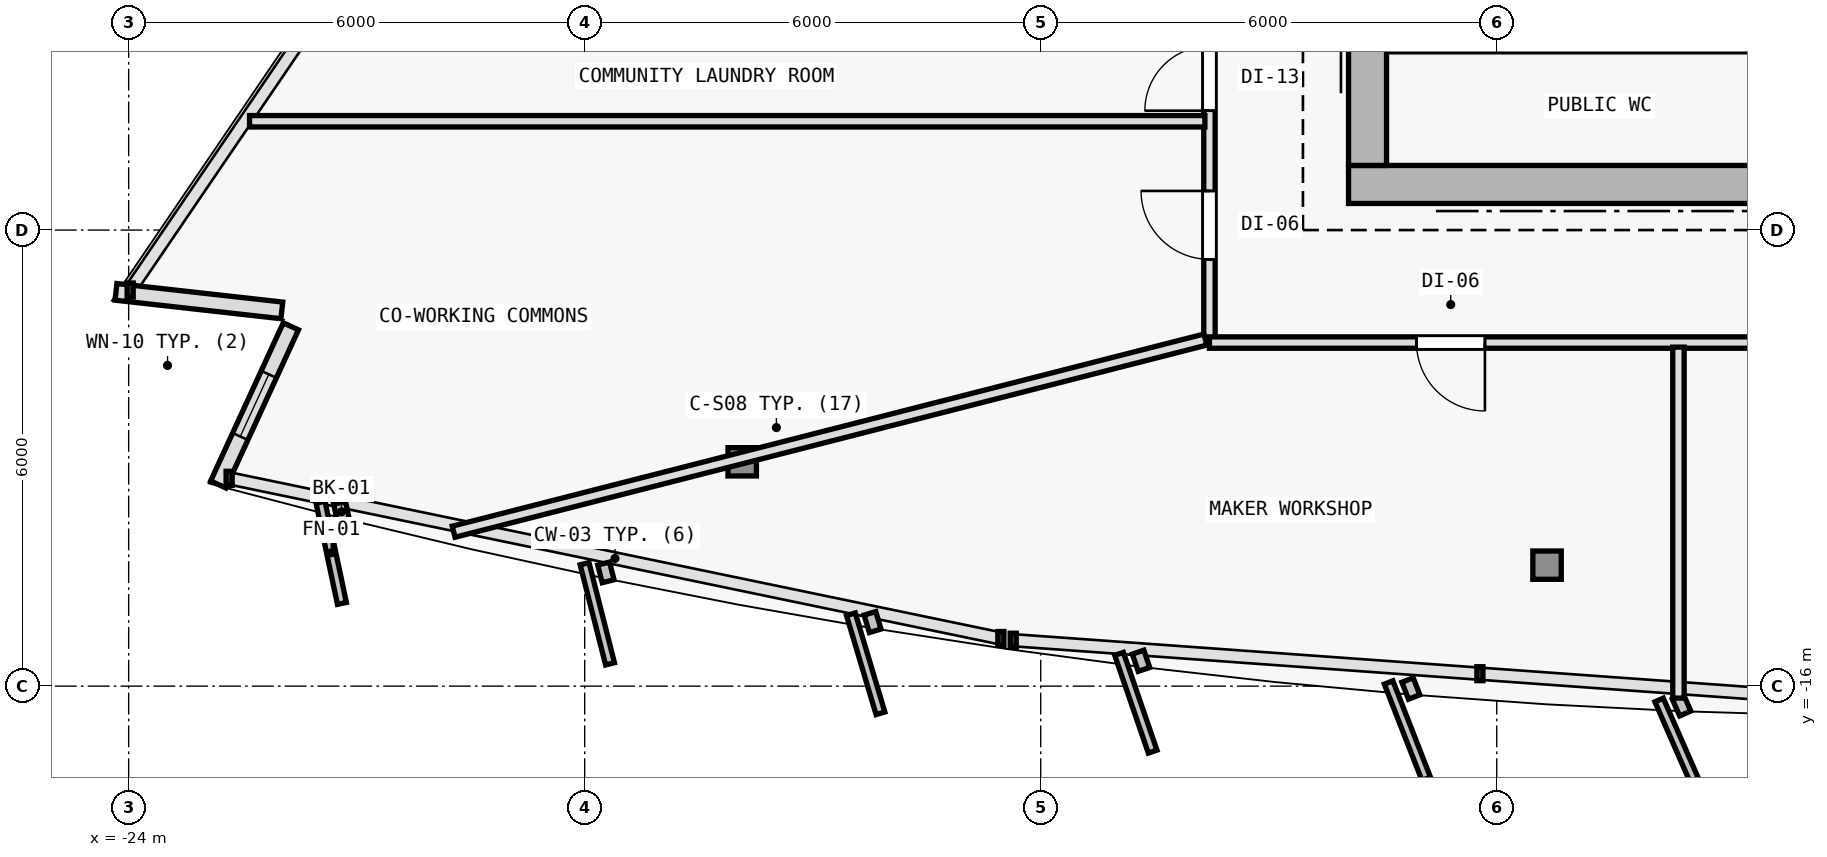
"""IFC4 building model, lengths in metres.
Left out: names, types, materials, properties, quantities, classifications, styles, units other than length and angle.
Written with IfcOpenShell. Run it as: python <this file> out.ifc"""

import sys

from ifc_helpers import new_model, si_unit, direction, frame, frame_2d, origin, origin_2d, place, context, subcontext, project, spatial, rectangle, i_section, extrude, element, fill, save


model = new_model("IFC4")
c1 = context("Model", 3, precision=1e-05, world=origin(), true_north=direction((0.0, 1.0)))
c2 = subcontext(c1, "Body", "Model", "MODEL_VIEW")
j1 = project(units=[si_unit("LENGTHUNIT", "METRE"), si_unit("PLANEANGLEUNIT", "RADIAN")], contexts=[c1])
p1 = place(None, origin())
s1 = spatial("IfcSite", under=j1, at=p1, CompositionType="ELEMENT")
p2 = place(p1, origin())
s2 = spatial("IfcBuilding", under=s1, at=p2, CompositionType="ELEMENT")
p3 = place(p2, frame((0.0, 0.0, 250.8)))
s3 = spatial("IfcBuildingStorey", under=s2, at=p3, CompositionType="ELEMENT", Elevation=250.8)
p4 = place(p3, frame((-7.7, -9.4, 0.0), z_axis=(0.0, 0.0, 1.0), x_axis=(1.0, 0.0, 0.0)))
e1 = element("IfcColumn", 1, at=p4, inside=s3, PredefinedType="COLUMN", context=c2, shape_type="SweptSolid", body=[
    extrude(i_section(OverallWidth=0.374, OverallDepth=0.372, WebThickness=0.012, FlangeThickness=0.02, FilletRadius=0.015, at=origin_2d()), origin(), (0.0, 0.0, 1.0), 3.6),
])
p5 = place(p3, frame((-15.927, -13.049, 0.005), z_axis=(0.020594893987, 0.033509183946, 0.999226193078), x_axis=(-0.851954850327, 0.523615252838, 0.0)))
e2 = element("IfcColumn", 2, at=p5, inside=s3, PredefinedType="COLUMN", context=c2, shape_type="SweptSolid", body=[
    extrude(i_section(OverallWidth=0.374, OverallDepth=0.372, WebThickness=0.012, FlangeThickness=0.02, FilletRadius=0.015, at=origin_2d()), origin(), (0.0, 0.0, 1.0), 3.592),
])
p6 = place(p3, frame((-5.338, -14.408, 0.005), z_axis=(0.006865841702, 0.035280909339, 0.999353850072), x_axis=(-0.981585848295, 0.191021523464, 0.0)))
e3 = element("IfcColumn", 3, at=p6, inside=s3, PredefinedType="COLUMN", context=c2, shape_type="SweptSolid", body=[
    extrude(i_section(OverallWidth=0.374, OverallDepth=0.372, WebThickness=0.012, FlangeThickness=0.02, FilletRadius=0.015, at=origin_2d()), origin(), (0.0, 0.0, 1.0), 3.592),
])
p7 = place(p3, frame((-21.985, -11.057, 0.0), z_axis=(0.0, 0.0, 1.0), x_axis=(-0.993823926228, 0.110968480463, 0.0)))
e4 = element("IfcWall", 4, at=p7, inside=s3, PredefinedType="SOLIDWALL", context=c2, shape_type="SweptSolid", body=[
    extrude(rectangle(XDim=2.196, YDim=0.22, at=frame_2d((1.098, 0.0))), origin(), (0.0, 0.0, 1.0), 3.35),
])
p8 = place(p3, frame((-22.822, -13.347, 0.0), z_axis=(0.0, 0.0, 1.0), x_axis=(0.417447808253, 0.908700900949, 0.0)))
e5 = element("IfcWall", 5, at=p8, inside=s3, PredefinedType="SOLIDWALL", context=c2, shape_type="SweptSolid", body=[
    extrude(rectangle(XDim=2.289, YDim=0.22, at=frame_2d((1.145, 0.0))), origin(), (0.0, 0.0, 1.0), 3.35),
])
p9 = place(p8, frame((0.695, 0.0, 0.62)))
e6 = element("IfcOpeningElement", 6, at=p9, cuts=e5, PredefinedType="OPENING", context=c2, shape_type="SweptSolid", body=[
    extrude(rectangle(XDim=0.9, YDim=1.6, at=frame_2d((0.45, 0.8))), frame((0.0, 0.12, 0.0), z_axis=(0.0, -1.0, 0.0), x_axis=(1.0, 0.0, 0.0)), (0.0, 0.0, 1.0), 0.24),
])
p10 = place(p3, frame((-7.95, -9.4, 0.0), z_axis=(0.0, 0.0, 1.0), x_axis=(1.0, 0.0, 0.0)))
e7 = element("IfcWall", 7, at=p10, inside=s3, PredefinedType="SHEAR", context=c2, shape_type="SweptSolid", body=[
    extrude(rectangle(XDim=15.9, YDim=0.5, at=frame_2d((7.95, 0.0))), origin(), (0.0, 0.0, 1.0), 3.35),
])
p11 = place(p10, frame((9.6, 0.0, 0.0)))
e8 = element("IfcOpeningElement", 8, at=p11, cuts=e7, PredefinedType="OPENING", context=c2, shape_type="SweptSolid", body=[
    extrude(rectangle(XDim=1.5, YDim=2.2, at=frame_2d((0.75, 1.1))), frame((0.0, 0.26, 0.0), z_axis=(0.0, -1.0, 0.0), x_axis=(1.0, 0.0, 0.0)), (0.0, 0.0, 1.0), 0.52),
])
p12 = place(p3, frame((-7.7, -9.15, 0.0), z_axis=(0.0, 0.0, 1.0), x_axis=(0.0, 1.0, 0.0)))
e9 = element("IfcWall", 9, at=p12, inside=s3, PredefinedType="SHEAR", context=c2, shape_type="SweptSolid", body=[
    extrude(rectangle(XDim=19.1, YDim=0.5, at=frame_2d((9.55, 0.0))), origin(), (0.0, 0.0, 1.0), 3.35),
])
p13 = place(p12, frame((12.7, 0.0, 0.0)))
e10 = element("IfcOpeningElement", 10, at=p13, cuts=e9, PredefinedType="OPENING", context=c2, shape_type="SweptSolid", body=[
    extrude(rectangle(XDim=1.1, YDim=2.15, at=frame_2d((0.55, 1.075))), frame((0.0, 0.26, 0.0), z_axis=(0.0, -1.0, 0.0), x_axis=(1.0, 0.0, 0.0)), (0.0, 0.0, 1.0), 0.52),
])
p14 = place(p3, frame((-9.78, -11.48, 0.0), z_axis=(0.0, 0.0, 1.0), x_axis=(0.0, 1.0, 0.0)))
e11 = element("IfcWall", 11, at=p14, inside=s3, PredefinedType="PARTITIONING", context=c2, shape_type="SweptSolid", body=[
    extrude(rectangle(XDim=19.706, YDim=0.15, at=frame_2d((9.853, 0.0))), origin(), (0.0, 0.0, 1.0), 2.875),
])
p15 = place(p14, frame((9.286, 0.0, 0.0)))
e12 = element("IfcOpeningElement", 12, at=p15, cuts=e11, PredefinedType="OPENING", context=c2, shape_type="SweptSolid", body=[
    extrude(rectangle(XDim=0.9, YDim=2.1, at=frame_2d((0.45, 1.05))), frame((0.0, 0.085, 0.0), z_axis=(0.0, -1.0, 0.0), x_axis=(1.0, 0.0, 0.0)), (0.0, 0.0, 1.0), 0.17),
])
p16 = place(p14, frame((6.969, 0.0, 0.0)))
e13 = element("IfcOpeningElement", 13, at=p16, cuts=e11, PredefinedType="OPENING", context=c2, shape_type="SweptSolid", body=[
    extrude(rectangle(XDim=0.9, YDim=2.1, at=frame_2d((0.45, 1.05))), frame((0.0, 0.085, 0.0), z_axis=(0.0, -1.0, 0.0), x_axis=(1.0, 0.0, 0.0)), (0.0, 0.0, 1.0), 0.17),
])
p17 = place(p14, frame((4.743, 0.0, 0.0)))
e14 = element("IfcOpeningElement", 14, at=p17, cuts=e11, PredefinedType="OPENING", context=c2, shape_type="SweptSolid", body=[
    extrude(rectangle(XDim=0.9, YDim=2.1, at=frame_2d((0.45, 1.05))), frame((0.0, 0.085, 0.0), z_axis=(0.0, -1.0, 0.0), x_axis=(1.0, 0.0, 0.0)), (0.0, 0.0, 1.0), 0.17),
])
p18 = place(p14, frame((3.051, 0.0, 0.0)))
e15 = element("IfcOpeningElement", 15, at=p18, cuts=e11, PredefinedType="OPENING", context=c2, shape_type="SweptSolid", body=[
    extrude(rectangle(XDim=0.85, YDim=2.1, at=frame_2d((0.425, 1.05))), frame((0.0, 0.085, 0.0), z_axis=(0.0, -1.0, 0.0), x_axis=(1.0, 0.0, 0.0)), (0.0, 0.0, 1.0), 0.17),
])
p19 = place(p14, frame((1.095, 0.0, 0.0)))
e16 = element("IfcOpeningElement", 16, at=p19, cuts=e11, PredefinedType="OPENING", context=c2, shape_type="SweptSolid", body=[
    extrude(rectangle(XDim=0.9, YDim=2.1, at=frame_2d((0.45, 1.05))), frame((0.0, 0.085, 0.0), z_axis=(0.0, -1.0, 0.0), x_axis=(1.0, 0.0, 0.0)), (0.0, 0.0, 1.0), 0.17),
])
p20 = place(p14, frame((14.03, 0.0, 0.0)))
e17 = element("IfcOpeningElement", 17, at=p20, cuts=e11, PredefinedType="OPENING", context=c2, shape_type="SweptSolid", body=[
    extrude(rectangle(XDim=0.9, YDim=2.1, at=frame_2d((0.45, 1.05))), frame((0.0, 0.085, 0.0), z_axis=(0.0, -1.0, 0.0), x_axis=(1.0, 0.0, 0.0)), (0.0, 0.0, 1.0), 0.17),
])
p21 = place(p14, frame((11.64, 0.0, 0.0)))
e18 = element("IfcOpeningElement", 18, at=p21, cuts=e11, PredefinedType="OPENING", context=c2, shape_type="SweptSolid", body=[
    extrude(rectangle(XDim=0.9, YDim=2.1, at=frame_2d((0.45, 1.05))), frame((0.0, 0.085, 0.0), z_axis=(0.0, -1.0, 0.0), x_axis=(1.0, 0.0, 0.0)), (0.0, 0.0, 1.0), 0.17),
])
p22 = place(p3, frame((9.78, -11.48, 0.0), z_axis=(0.0, 0.0, 1.0), x_axis=(-1.0, 0.0, 0.0)))
e19 = element("IfcWall", 19, at=p22, inside=s3, PredefinedType="PARTITIONING", context=c2, shape_type="SweptSolid", body=[
    extrude(rectangle(XDim=19.56, YDim=0.15, at=frame_2d((9.78, 0.0))), origin(), (0.0, 0.0, 1.0), 3.025),
])
p23 = place(p22, frame((15.936, 0.0, 0.0)))
e20 = element("IfcOpeningElement", 20, at=p23, cuts=e19, PredefinedType="OPENING", context=c2, shape_type="SweptSolid", body=[
    extrude(rectangle(XDim=0.9, YDim=2.1, at=frame_2d((0.45, 1.05))), frame((0.0, 0.085, 0.0), z_axis=(0.0, -1.0, 0.0), x_axis=(1.0, 0.0, 0.0)), (0.0, 0.0, 1.0), 0.17),
])
p24 = place(p22, frame((8.472, 0.0, 0.0)))
e21 = element("IfcOpeningElement", 21, at=p24, cuts=e19, PredefinedType="OPENING", context=c2, shape_type="SweptSolid", body=[
    extrude(rectangle(XDim=0.9, YDim=2.1, at=frame_2d((0.45, 1.05))), frame((0.0, 0.085, 0.0), z_axis=(0.0, -1.0, 0.0), x_axis=(1.0, 0.0, 0.0)), (0.0, 0.0, 1.0), 0.17),
])
p25 = place(p22, frame((1.866, 0.0, 0.0)))
e22 = element("IfcOpeningElement", 22, at=p25, cuts=e19, PredefinedType="OPENING", context=c2, shape_type="SweptSolid", body=[
    extrude(rectangle(XDim=0.9, YDim=2.1, at=frame_2d((0.45, 1.05))), frame((0.0, 0.085, 0.0), z_axis=(0.0, -1.0, 0.0), x_axis=(1.0, 0.0, 0.0)), (0.0, 0.0, 1.0), 0.17),
])
p26 = place(p3, frame((-9.833, -11.441, 0.0), z_axis=(0.0, 0.0, 1.0), x_axis=(-0.968857431137, -0.247619220033, 0.0)))
e23 = element("IfcWall", 23, at=p26, inside=s3, PredefinedType="PARTITIONING", context=c2, shape_type="SweptSolid", body=[
    extrude(rectangle(XDim=10.208, YDim=0.15, at=frame_2d((5.104, 0.0))), origin(), (0.0, 0.0, 1.0), 2.925),
])
p27 = place(p3, frame((-9.84, -8.569, 0.0), z_axis=(0.0, 0.0, 1.0), x_axis=(-1.0, 0.0, 0.0)))
e24 = element("IfcWall", 24, at=p27, inside=s3, PredefinedType="PARTITIONING", context=c2, shape_type="SweptSolid", body=[
    extrude(rectangle(XDim=12.569, YDim=0.15, at=frame_2d((6.285, 0.0))), origin(), (0.0, 0.0, 1.0), 2.875),
])
p28 = place(p3, frame((-3.609, -11.54, 0.0), z_axis=(0.0, 0.0, 1.0), x_axis=(0.0, -1.0, 0.0)))
e25 = element("IfcWall", 25, at=p28, inside=s3, PredefinedType="PARTITIONING", context=c2, shape_type="SweptSolid", body=[
    extrude(rectangle(XDim=4.618, YDim=0.15, at=frame_2d((2.309, 0.0))), origin(), (0.0, 0.0, 1.0), 2.925),
])
p29 = place(p9, origin())
e26 = element("IfcWindow", 26, at=p29, inside=s3, PartitioningType="SINGLE_PANEL", PredefinedType="WINDOW", context=c2, shape_type="SweptSolid", body=[
    extrude(rectangle(XDim=0.9, YDim=1.6, at=frame_2d((0.45, 0.8))), frame((0.0, 0.03, 0.0), z_axis=(0.0, -1.0, 0.0), x_axis=(1.0, 0.0, 0.0)), (0.0, 0.0, 1.0), 0.06),
])
fill(e6, e26)
p30 = place(p18, origin())
e27 = element("IfcDoor", 27, at=p30, inside=s3, OperationType="SINGLE_SWING_LEFT", PredefinedType="DOOR", context=c2, shape_type="SweptSolid", body=[
    extrude(rectangle(XDim=0.85, YDim=2.1, at=frame_2d((0.425, 1.05))), frame((0.0, 0.025, 0.0), z_axis=(0.0, -1.0, 0.0), x_axis=(1.0, 0.0, 0.0)), (0.0, 0.0, 1.0), 0.05),
])
fill(e15, e27)
p31 = place(p19, origin())
e28 = element("IfcDoor", 28, at=p31, inside=s3, OperationType="SINGLE_SWING_RIGHT", PredefinedType="DOOR", context=c2, shape_type="SweptSolid", body=[
    extrude(rectangle(XDim=0.9, YDim=2.1, at=frame_2d((0.45, 1.05))), frame((0.0, 0.025, 0.0), z_axis=(0.0, -1.0, 0.0), x_axis=(1.0, 0.0, 0.0)), (0.0, 0.0, 1.0), 0.05),
])
fill(e16, e28)
p32 = place(p23, origin())
e29 = element("IfcDoor", 29, at=p32, inside=s3, OperationType="SINGLE_SWING_LEFT", PredefinedType="DOOR", context=c2, shape_type="SweptSolid", body=[
    extrude(rectangle(XDim=0.9, YDim=2.1, at=frame_2d((0.45, 1.05))), frame((0.0, 0.025, 0.0), z_axis=(0.0, -1.0, 0.0), x_axis=(1.0, 0.0, 0.0)), (0.0, 0.0, 1.0), 0.05),
])
fill(e20, e29)
save(model, sys.argv[1])
